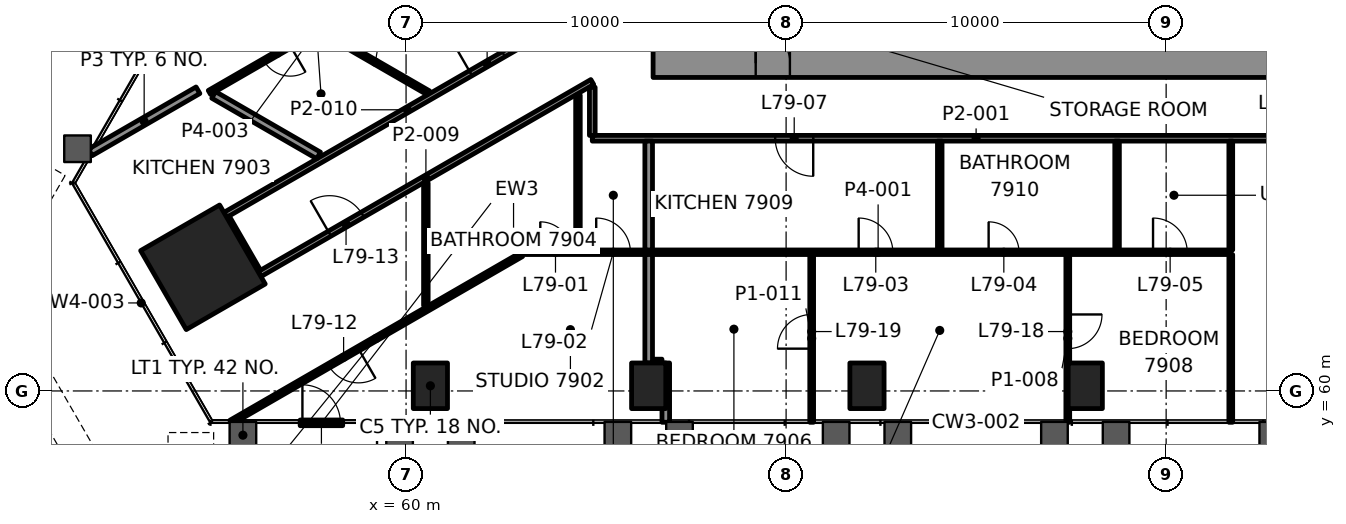
"""IFC4 building model, lengths in metres.
Left out: names, types, materials, properties, quantities, classifications, styles, units other than length and angle.
Written with IfcOpenShell. Run it as: python <this file> out.ifc"""

import sys

from ifc_helpers import new_model, si_unit, direction, frame, frame_2d, origin, origin_2d, place, context, subcontext, project, spatial, rectangle, hollow_rectangle, extrude, element, fill, save


model = new_model("IFC4")
c1 = context("Model", 3, precision=1e-05, world=origin(), true_north=direction((0.0, 1.0)))
c2 = subcontext(c1, "Body", "Model", "MODEL_VIEW")
j1 = project(units=[si_unit("LENGTHUNIT", "METRE"), si_unit("PLANEANGLEUNIT", "RADIAN")], contexts=[c1])
p1 = place(None, origin())
s1 = spatial("IfcSite", under=j1, at=p1, CompositionType="ELEMENT")
p2 = place(p1, origin())
s2 = spatial("IfcBuilding", under=s1, at=p2, CompositionType="ELEMENT")
p3 = place(p2, frame((0.0, 0.0, 323.1)))
s3 = spatial("IfcBuildingStorey", under=s2, at=p3, CompositionType="ELEMENT", Elevation=323.1)
p4 = place(p3, frame((54.655, 63.254, 0.0), z_axis=(0.0, 0.0, 1.0), x_axis=(0.5, -0.866025403784, 0.0)))
e1 = element("IfcColumn", 1, at=p4, inside=s3, PredefinedType="COLUMN", context=c2, shape_type="SweptSolid", body=[
    extrude(rectangle(XDim=2.4, YDim=2.4, at=origin_2d()), origin(), (0.0, 0.0, 1.0), 3.5),
])
for number, where, z_axis, x_axis in (
    (2, (60.64, 60.136, -0.0), (0.0, 0.0, 1.0), (1.0, 0.0, 0.0)),
    (3, (66.384, 60.136, -0.0), (0.0, 0.0, 1.0), (1.0, 0.0, 0.0)),
    (4, (72.128, 60.136, -0.0), (0.0, 0.0, 1.0), (1.0, 0.0, 0.0)),
    (5, (77.872, 60.136, -0.0), (0.0, 0.0, 1.0), (1.0, 0.0, 0.0)),
):
    element("IfcColumn", number, at=place(p3, frame(where, z_axis=z_axis, x_axis=x_axis)), inside=s3, PredefinedType="COLUMN", context=c2, shape_type="SweptSolid", body=[
        extrude(hollow_rectangle(XDim=0.9, YDim=1.2, WallThickness=0.06, at=origin_2d()), origin(), (0.0, 0.0, 1.0), 3.5),
    ])
p5 = place(p3, frame((66.5, 68.625, 0.0), z_axis=(0.0, 0.0, 1.0), x_axis=(1.0, 0.0, 0.0)))
e6 = element("IfcWall", 6, at=p5, inside=s3, PredefinedType="SHEAR", context=c2, shape_type="SweptSolid", body=[
    extrude(rectangle(XDim=17.0, YDim=0.75, at=frame_2d((8.5, 0.0))), origin(), (0.0, 0.0, 1.0), 3.2),
])
p6 = place(p5, frame((2.7, 0.0, 0.0)))
e7 = element("IfcOpeningElement", 7, at=p6, cuts=e6, PredefinedType="OPENING", context=c2, shape_type="SweptSolid", body=[
    extrude(rectangle(XDim=0.9, YDim=2.1, at=frame_2d((0.45, 1.05))), frame((0.0, 0.385, 0.0), z_axis=(0.0, -1.0, 0.0), x_axis=(1.0, 0.0, 0.0)), (0.0, 0.0, 1.0), 0.77),
])
p7 = place(p3, frame((66.484, 60.736, 0.0), z_axis=(0.0, 0.0, 1.0), x_axis=(1.0, 0.0, 0.0)))
e8 = element("IfcWall", 8, at=p7, inside=s3, PredefinedType="PARTITIONING", context=c2, shape_type="SweptSolid", body=[
    extrude(rectangle(XDim=0.25, YDim=0.2, at=frame_2d((0.125, 0.0))), origin(), (0.0, 0.0, 1.0), 2.6),
])
p8 = place(p3, frame((63.141, 63.65, 0.0), z_axis=(0.0, 0.0, 1.0), x_axis=(1.0, 0.0, 0.0)))
e9 = element("IfcWall", 9, at=p8, inside=s3, PredefinedType="PARTITIONING", context=c2, shape_type="SweptSolid", body=[
    extrude(rectangle(XDim=18.56, YDim=0.12, at=frame_2d((9.28, 0.0))), origin(), (0.0, 0.0, 1.0), 2.6),
])
p9 = place(p8, frame((0.391, 0.0, 0.0)))
e10 = element("IfcOpeningElement", 10, at=p9, cuts=e9, PredefinedType="OPENING", context=c2, shape_type="SweptSolid", body=[
    extrude(rectangle(XDim=0.8, YDim=2.1, at=frame_2d((0.4, 1.05))), frame((0.0, 0.07, 0.0), z_axis=(0.0, -1.0, 0.0), x_axis=(1.0, 0.0, 0.0)), (0.0, 0.0, 1.0), 0.14),
])
p10 = place(p8, frame((1.862, 0.0, 0.0)))
e11 = element("IfcOpeningElement", 11, at=p10, cuts=e9, PredefinedType="OPENING", context=c2, shape_type="SweptSolid", body=[
    extrude(rectangle(XDim=0.9, YDim=2.1, at=frame_2d((0.45, 1.05))), frame((0.0, 0.07, 0.0), z_axis=(0.0, -1.0, 0.0), x_axis=(1.0, 0.0, 0.0)), (0.0, 0.0, 1.0), 0.14),
])
p11 = place(p8, frame((8.768, 0.0, 0.0)))
e12 = element("IfcOpeningElement", 12, at=p11, cuts=e9, PredefinedType="OPENING", context=c2, shape_type="SweptSolid", body=[
    extrude(rectangle(XDim=0.9, YDim=2.1, at=frame_2d((0.45, 1.05))), frame((0.0, 0.07, 0.0), z_axis=(0.0, -1.0, 0.0), x_axis=(1.0, 0.0, 0.0)), (0.0, 0.0, 1.0), 0.14),
])
p12 = place(p8, frame((12.188, 0.0, 0.0)))
e13 = element("IfcOpeningElement", 13, at=p12, cuts=e9, PredefinedType="OPENING", context=c2, shape_type="SweptSolid", body=[
    extrude(rectangle(XDim=0.8, YDim=2.1, at=frame_2d((0.4, 1.05))), frame((0.0, 0.07, 0.0), z_axis=(0.0, -1.0, 0.0), x_axis=(1.0, 0.0, 0.0)), (0.0, 0.0, 1.0), 0.14),
])
p13 = place(p8, frame((16.514, 0.0, 0.0)))
e14 = element("IfcOpeningElement", 14, at=p13, cuts=e9, PredefinedType="OPENING", context=c2, shape_type="SweptSolid", body=[
    extrude(rectangle(XDim=0.9, YDim=2.1, at=frame_2d((0.45, 1.05))), frame((0.0, 0.07, 0.0), z_axis=(0.0, -1.0, 0.0), x_axis=(1.0, 0.0, 0.0)), (0.0, 0.0, 1.0), 0.14),
])
p14 = place(p3, frame((85.099, 66.65, 0.0), z_axis=(0.0, 0.0, 1.0), x_axis=(-1.0, 0.0, 0.0)))
e15 = element("IfcWall", 15, at=p14, inside=s3, PredefinedType="PARTITIONING", context=c2, shape_type="SweptSolid", body=[
    extrude(rectangle(XDim=20.199, YDim=0.15, at=frame_2d((10.1, 0.0))), origin(), (0.0, 0.0, 1.0), 2.6),
])
p15 = place(p14, frame((1.351, 0.0, 0.0)))
e16 = element("IfcOpeningElement", 16, at=p15, cuts=e15, PredefinedType="OPENING", context=c2, shape_type="SweptSolid", body=[
    extrude(rectangle(XDim=0.9, YDim=2.1, at=frame_2d((0.45, 1.05))), frame((0.0, 0.085, 0.0), z_axis=(0.0, -1.0, 0.0), x_axis=(1.0, 0.0, 0.0)), (0.0, 0.0, 1.0), 0.17),
])
p16 = place(p14, frame((14.386, 0.0, 0.0)))
e17 = element("IfcOpeningElement", 17, at=p16, cuts=e15, PredefinedType="OPENING", context=c2, shape_type="SweptSolid", body=[
    extrude(rectangle(XDim=1.0, YDim=2.1, at=frame_2d((0.5, 1.05))), frame((0.0, 0.085, 0.0), z_axis=(0.0, -1.0, 0.0), x_axis=(1.0, 0.0, 0.0)), (0.0, 0.0, 1.0), 0.17),
])
p17 = place(p3, frame((63.037, 63.59, 0.0), z_axis=(0.0, 0.0, 1.0), x_axis=(-0.866029008523, -0.499993756358, 0.0)))
e18 = element("IfcWall", 18, at=p17, inside=s3, PredefinedType="PARTITIONING", context=c2, shape_type="SweptSolid", body=[
    extrude(rectangle(XDim=8.828, YDim=0.12, at=frame_2d((4.414, 0.0))), origin(), (0.0, 0.0, 1.0), 2.6),
])
p18 = place(p17, frame((4.955, 0.0, 0.0)))
e19 = element("IfcOpeningElement", 19, at=p18, cuts=e18, PredefinedType="OPENING", context=c2, shape_type="SweptSolid", body=[
    extrude(rectangle(XDim=0.9, YDim=2.1, at=frame_2d((0.45, 1.05))), frame((0.0, 0.07, 0.0), z_axis=(0.0, -1.0, 0.0), x_axis=(1.0, 0.0, 0.0)), (0.0, 0.0, 1.0), 0.14),
])
p19 = place(p3, frame((56.145, 63.075, 0.0), z_axis=(0.0, 0.0, 1.0), x_axis=(0.866024727794, 0.500001170848, 0.0)))
e20 = element("IfcWall", 20, at=p19, inside=s3, PredefinedType="PARTITIONING", context=c2, shape_type="SweptSolid", body=[
    extrude(rectangle(XDim=10.11, YDim=0.15, at=frame_2d((5.055, 0.0))), origin(), (0.0, 0.0, 1.0), 2.597),
])
p20 = place(p19, frame((2.128, 0.0, 0.0)))
e21 = element("IfcOpeningElement", 21, at=p20, cuts=e20, PredefinedType="OPENING", context=c2, shape_type="SweptSolid", body=[
    extrude(rectangle(XDim=1.0, YDim=2.1, at=frame_2d((0.5, 1.05))), frame((0.0, 0.085, 0.0), z_axis=(0.0, -1.0, 0.0), x_axis=(1.0, 0.0, 0.0)), (0.0, 0.0, 1.0), 0.17),
])
p21 = place(p3, frame((55.244, 64.634, 0.0), z_axis=(0.0, 0.0, 1.0), x_axis=(0.866029028053, 0.499993722531, 0.0)))
e22 = element("IfcWall", 22, at=p21, inside=s3, PredefinedType="PARTITIONING", context=c2, shape_type="SweptSolid", body=[
    extrude(rectangle(XDim=11.063, YDim=0.15, at=frame_2d((5.531, 0.0))), origin(), (0.0, 0.0, 1.0), 2.6),
])
p22 = place(p21, frame((7.454, 0.0, 0.0)))
e23 = element("IfcOpeningElement", 23, at=p22, cuts=e22, PredefinedType="OPENING", context=c2, shape_type="SweptSolid", body=[
    extrude(rectangle(XDim=1.0, YDim=2.1, at=frame_2d((0.5, 1.05))), frame((0.0, 0.085, 0.0), z_axis=(0.0, -1.0, 0.0), x_axis=(1.0, 0.0, 0.0)), (0.0, 0.0, 1.0), 0.17),
])
p23 = place(p3, frame((60.485, 71.123, 0.0), z_axis=(0.0, 0.0, 1.0), x_axis=(-0.866018230694, -0.500012423951, 0.0)))
e24 = element("IfcWall", 24, at=p23, inside=s3, PredefinedType="PARTITIONING", context=c2, shape_type="SweptSolid", body=[
    extrude(rectangle(XDim=6.535, YDim=0.12, at=frame_2d((3.268, 0.0))), origin(), (0.0, 0.0, 1.0), 2.6),
])
p24 = place(p23, frame((1.261, 0.0, 0.0)))
e25 = element("IfcOpeningElement", 25, at=p24, cuts=e24, PredefinedType="OPENING", context=c2, shape_type="SweptSolid", body=[
    extrude(rectangle(XDim=0.9, YDim=2.1, at=frame_2d((0.45, 1.05))), frame((0.0, 0.07, 0.0), z_axis=(0.0, -1.0, 0.0), x_axis=(1.0, 0.0, 0.0)), (0.0, 0.0, 1.0), 0.14),
])
p25 = place(p23, frame((4.077, 0.0, 0.0)))
e26 = element("IfcOpeningElement", 26, at=p25, cuts=e24, PredefinedType="OPENING", context=c2, shape_type="SweptSolid", body=[
    extrude(rectangle(XDim=0.8, YDim=2.1, at=frame_2d((0.4, 1.05))), frame((0.0, 0.07, 0.0), z_axis=(0.0, -1.0, 0.0), x_axis=(1.0, 0.0, 0.0)), (0.0, 0.0, 1.0), 0.14),
])
p26 = place(p3, frame((51.692, 66.278, 0.0), z_axis=(0.0, 0.0, 1.0), x_axis=(0.866020247087, 0.500008931556, 0.0)))
e27 = element("IfcWall", 27, at=p26, inside=s3, PredefinedType="PARTITIONING", context=c2, shape_type="SweptSolid", body=[
    extrude(rectangle(XDim=3.271, YDim=0.2, at=frame_2d((1.635, 0.0))), origin(), (0.0, 0.0, 1.0), 2.6),
])
p27 = place(p3, frame((81.701, 59.176, 0.0), z_axis=(0.0, 0.0, 1.0), x_axis=(0.0, 1.0, 0.0)))
e28 = element("IfcWall", 28, at=p27, inside=s3, PredefinedType="PARTITIONING", context=c2, shape_type="SweptSolid", body=[
    extrude(rectangle(XDim=4.414, YDim=0.1, at=frame_2d((2.207, 0.0))), origin(), (0.0, 0.0, 1.0), 2.588),
])
p28 = place(p3, frame((78.709, 63.71, 0.0), z_axis=(0.0, 0.0, 1.0), x_axis=(0.0, 1.0, 0.0)))
e29 = element("IfcWall", 29, at=p28, inside=s3, PredefinedType="PARTITIONING", context=c2, shape_type="SweptSolid", body=[
    extrude(rectangle(XDim=2.865, YDim=0.12, at=frame_2d((1.433, 0.0))), origin(), (0.0, 0.0, 1.0), 2.6),
])
p29 = place(p3, frame((77.412, 63.59, 0.0), z_axis=(0.0, 0.0, 1.0), x_axis=(0.0, -1.0, 0.0)))
e30 = element("IfcWall", 30, at=p29, inside=s3, PredefinedType="PARTITIONING", context=c2, shape_type="SweptSolid", body=[
    extrude(rectangle(XDim=4.414, YDim=0.1, at=frame_2d((2.207, 0.0))), origin(), (0.0, 0.0, 1.0), 2.588),
])
p30 = place(p29, frame((1.577, 0.0, 0.0)))
e31 = element("IfcOpeningElement", 31, at=p30, cuts=e30, PredefinedType="OPENING", context=c2, shape_type="SweptSolid", body=[
    extrude(rectangle(XDim=0.9, YDim=2.1, at=frame_2d((0.45, 1.05))), frame((0.0, 0.06, 0.0), z_axis=(0.0, -1.0, 0.0), x_axis=(1.0, 0.0, 0.0)), (0.0, 0.0, 1.0), 0.12),
])
p31 = place(p3, frame((74.043, 63.71, 0.0), z_axis=(0.0, 0.0, 1.0), x_axis=(0.0, 1.0, 0.0)))
e32 = element("IfcWall", 32, at=p31, inside=s3, PredefinedType="PARTITIONING", context=c2, shape_type="SweptSolid", body=[
    extrude(rectangle(XDim=2.865, YDim=0.12, at=frame_2d((1.433, 0.0))), origin(), (0.0, 0.0, 1.0), 2.6),
])
p32 = place(p3, frame((70.673, 59.176, 0.0), z_axis=(0.0, 0.0, 1.0), x_axis=(0.0, 1.0, 0.0)))
e33 = element("IfcWall", 33, at=p32, inside=s3, PredefinedType="PARTITIONING", context=c2, shape_type="SweptSolid", body=[
    extrude(rectangle(XDim=4.414, YDim=0.1, at=frame_2d((2.207, 0.0))), origin(), (0.0, 0.0, 1.0), 2.588),
])
p33 = place(p32, frame((1.937, 0.0, 0.0)))
e34 = element("IfcOpeningElement", 34, at=p33, cuts=e33, PredefinedType="OPENING", context=c2, shape_type="SweptSolid", body=[
    extrude(rectangle(XDim=0.9, YDim=2.1, at=frame_2d((0.45, 1.05))), frame((0.0, 0.06, 0.0), z_axis=(0.0, -1.0, 0.0), x_axis=(1.0, 0.0, 0.0)), (0.0, 0.0, 1.0), 0.12),
])
p34 = place(p3, frame((66.834, 59.176, 0.0), z_axis=(0.0, 0.0, 1.0), x_axis=(0.0, 1.0, 0.0)))
e35 = element("IfcWall", 35, at=p34, inside=s3, PredefinedType="PARTITIONING", context=c2, shape_type="SweptSolid", body=[
    extrude(rectangle(XDim=1.56, YDim=0.2, at=frame_2d((0.78, 0.0))), origin(), (0.0, 0.0, 1.0), 2.588),
])
p35 = place(p3, frame((66.384, 60.736, 0.0), z_axis=(0.0, 0.0, 1.0), x_axis=(0.0, 1.0, 0.0)))
e36 = element("IfcWall", 36, at=p35, inside=s3, PredefinedType="PARTITIONING", context=c2, shape_type="SweptSolid", body=[
    extrude(rectangle(XDim=2.854, YDim=0.2, at=frame_2d((1.427, 0.0))), origin(), (0.0, 0.0, 1.0), 2.6),
])
p36 = place(p3, frame((64.9, 66.725, 0.0), z_axis=(0.0, 0.0, 1.0), x_axis=(0.0, 1.0, 0.0)))
e37 = element("IfcWall", 37, at=p36, inside=s3, PredefinedType="PARTITIONING", context=c2, shape_type="SweptSolid", body=[
    extrude(rectangle(XDim=1.268, YDim=0.15, at=frame_2d((0.634, 0.0))), origin(), (0.0, 0.0, 1.0), 2.597),
])
p37 = place(p3, frame((64.523, 63.71, 0.0), z_axis=(0.0, 0.0, 1.0), x_axis=(0.0, 1.0, 0.0)))
e38 = element("IfcWall", 38, at=p37, inside=s3, PredefinedType="PARTITIONING", context=c2, shape_type="SweptSolid", body=[
    extrude(rectangle(XDim=4.075, YDim=0.12, at=frame_2d((2.038, 0.0))), origin(), (0.0, 0.0, 1.0), 2.597),
])
p38 = place(p3, frame((60.521, 62.247, 0.0), z_axis=(0.0, 0.0, 1.0), x_axis=(0.0, 1.0, 0.0)))
e39 = element("IfcWall", 39, at=p38, inside=s3, PredefinedType="PARTITIONING", context=c2, shape_type="SweptSolid", body=[
    extrude(rectangle(XDim=3.228, YDim=0.12, at=frame_2d((1.614, 0.0))), origin(), (0.0, 0.0, 1.0), 2.6),
])
p39 = place(p3, frame((56.106, 63.139, 0.0), z_axis=(0.0, 0.0, 1.0), x_axis=(-0.499944585209, 0.866057395165, 0.0)))
e40 = element("IfcWall", 40, at=p39, inside=s3, PredefinedType="PARTITIONING", context=c2, shape_type="SweptSolid", body=[
    extrude(rectangle(XDim=1.649, YDim=0.15, at=frame_2d((0.825, 0.0))), origin(), (0.0, 0.0, 1.0), 2.597),
])
p40 = place(p3, frame((60.588, 67.845, 0.0), z_axis=(0.0, 0.0, 1.0), x_axis=(-0.86605210011, 0.499953757757, 0.0)))
e41 = element("IfcWall", 41, at=p40, inside=s3, PredefinedType="PARTITIONING", context=c2, shape_type="SweptSolid", body=[
    extrude(rectangle(XDim=3.228, YDim=0.12, at=frame_2d((1.614, 0.0))), origin(), (0.0, 0.0, 1.0), 2.6),
])
p41 = place(p3, frame((57.698, 66.197, 0.0), z_axis=(0.0, 0.0, 1.0), x_axis=(-0.866019818373, 0.500009674092, 0.0)))
e42 = element("IfcWall", 42, at=p41, inside=s3, PredefinedType="PARTITIONING", context=c2, shape_type="SweptSolid", body=[
    extrude(rectangle(XDim=3.188, YDim=0.2, at=frame_2d((1.594, 0.0))), origin(), (0.0, 0.0, 1.0), 2.6),
])
p42 = place(p3, frame((81.701, 63.71, 0.0), z_axis=(0.0, 0.0, 1.0), x_axis=(0.0, 1.0, 0.0)))
e43 = element("IfcWall", 43, at=p42, inside=s3, PredefinedType="PARTITIONING", context=c2, shape_type="SweptSolid", body=[
    extrude(rectangle(XDim=2.865, YDim=0.1, at=frame_2d((1.433, 0.0))), origin(), (0.0, 0.0, 1.0), 2.6),
])
p43 = place(p3, frame((66.384, 63.71, 0.0), z_axis=(0.0, 0.0, 1.0), x_axis=(0.0, 1.0, 0.0)))
e44 = element("IfcWall", 44, at=p43, inside=s3, PredefinedType="PARTITIONING", context=c2, shape_type="SweptSolid", body=[
    extrude(rectangle(XDim=2.865, YDim=0.2, at=frame_2d((1.433, 0.0))), origin(), (0.0, 0.0, 1.0), 2.6),
])
p44 = place(p3, frame((69.117, 103.238, 0.0), z_axis=(0.0, 0.0, 1.0), x_axis=(-0.500001437611, -0.866024573778, 0.0)))
e45 = element("IfcWall", 45, at=p44, inside=s3, PredefinedType="SOLIDWALL", context=c2, shape_type="SweptSolid", body=[
    extrude(rectangle(XDim=43.027, YDim=0.8, at=frame_2d((21.513, 0.0))), origin(), (0.0, 0.0, 1.0), 0.9),
])
p45 = place(p3, frame((47.604, 64.967, 0.0), z_axis=(0.0, 0.0, 1.0), x_axis=(0.49999175339, -0.866030164915, 0.0)))
e46 = element("IfcWall", 46, at=p45, inside=s3, PredefinedType="SOLIDWALL", context=c2, shape_type="SweptSolid", body=[
    extrude(rectangle(XDim=10.019, YDim=0.8, at=frame_2d((5.009, 0.0))), origin(), (0.0, 0.0, 1.0), 0.9),
])
p46 = place(p9, origin())
e47 = element("IfcDoor", 47, at=p46, inside=s3, OperationType="SINGLE_SWING_RIGHT", PredefinedType="DOOR", context=c2, shape_type="SweptSolid", body=[
    extrude(rectangle(XDim=0.8, YDim=2.1, at=frame_2d((0.4, 1.05))), frame((0.0, 0.025, 0.0), z_axis=(0.0, -1.0, 0.0), x_axis=(1.0, 0.0, 0.0)), (0.0, 0.0, 1.0), 0.05),
])
fill(e10, e47)
p47 = place(p10, origin())
e48 = element("IfcDoor", 48, at=p47, inside=s3, OperationType="SINGLE_SWING_LEFT", PredefinedType="DOOR", context=c2, shape_type="SweptSolid", body=[
    extrude(rectangle(XDim=0.9, YDim=2.1, at=frame_2d((0.45, 1.05))), frame((0.0, 0.025, 0.0), z_axis=(0.0, -1.0, 0.0), x_axis=(1.0, 0.0, 0.0)), (0.0, 0.0, 1.0), 0.05),
])
fill(e11, e48)
p48 = place(p11, origin())
e49 = element("IfcDoor", 49, at=p48, inside=s3, OperationType="SINGLE_SWING_RIGHT", PredefinedType="DOOR", context=c2, shape_type="SweptSolid", body=[
    extrude(rectangle(XDim=0.9, YDim=2.1, at=frame_2d((0.45, 1.05))), frame((0.0, 0.025, 0.0), z_axis=(0.0, -1.0, 0.0), x_axis=(1.0, 0.0, 0.0)), (0.0, 0.0, 1.0), 0.05),
])
fill(e12, e49)
p49 = place(p12, origin())
e50 = element("IfcDoor", 50, at=p49, inside=s3, OperationType="SINGLE_SWING_LEFT", PredefinedType="DOOR", context=c2, shape_type="SweptSolid", body=[
    extrude(rectangle(XDim=0.8, YDim=2.1, at=frame_2d((0.4, 1.05))), frame((0.0, 0.025, 0.0), z_axis=(0.0, -1.0, 0.0), x_axis=(1.0, 0.0, 0.0)), (0.0, 0.0, 1.0), 0.05),
])
fill(e13, e50)
p50 = place(p13, origin())
e51 = element("IfcDoor", 51, at=p50, inside=s3, OperationType="SINGLE_SWING_RIGHT", PredefinedType="DOOR", context=c2, shape_type="SweptSolid", body=[
    extrude(rectangle(XDim=0.9, YDim=2.1, at=frame_2d((0.45, 1.05))), frame((0.0, 0.025, 0.0), z_axis=(0.0, -1.0, 0.0), x_axis=(1.0, 0.0, 0.0)), (0.0, 0.0, 1.0), 0.05),
])
fill(e14, e51)
p51 = place(p16, origin())
e52 = element("IfcDoor", 52, at=p51, inside=s3, OperationType="SINGLE_SWING_RIGHT", PredefinedType="DOOR", context=c2, shape_type="SweptSolid", body=[
    extrude(rectangle(XDim=1.0, YDim=2.1, at=frame_2d((0.5, 1.05))), frame((0.0, 0.025, 0.0), z_axis=(0.0, -1.0, 0.0), x_axis=(1.0, 0.0, 0.0)), (0.0, 0.0, 1.0), 0.05),
])
fill(e17, e52)
p52 = place(p18, origin())
e53 = element("IfcDoor", 53, at=p52, inside=s3, OperationType="SINGLE_SWING_LEFT", PredefinedType="DOOR", context=c2, shape_type="SweptSolid", body=[
    extrude(rectangle(XDim=0.9, YDim=2.1, at=frame_2d((0.45, 1.05))), frame((0.0, 0.025, 0.0), z_axis=(0.0, -1.0, 0.0), x_axis=(1.0, 0.0, 0.0)), (0.0, 0.0, 1.0), 0.05),
])
fill(e19, e53)
p53 = place(p20, origin())
e54 = element("IfcDoor", 54, at=p53, inside=s3, OperationType="SINGLE_SWING_LEFT", PredefinedType="DOOR", context=c2, shape_type="SweptSolid", body=[
    extrude(rectangle(XDim=1.0, YDim=2.1, at=frame_2d((0.5, 1.05))), frame((0.0, 0.025, 0.0), z_axis=(0.0, -1.0, 0.0), x_axis=(1.0, 0.0, 0.0)), (0.0, 0.0, 1.0), 0.05),
])
fill(e21, e54)
p54 = place(p22, origin())
e55 = element("IfcDoor", 55, at=p54, inside=s3, OperationType="SINGLE_SWING_LEFT", PredefinedType="DOOR", context=c2, shape_type="SweptSolid", body=[
    extrude(rectangle(XDim=1.0, YDim=2.1, at=frame_2d((0.5, 1.05))), frame((0.0, 0.025, 0.0), z_axis=(0.0, -1.0, 0.0), x_axis=(1.0, 0.0, 0.0)), (0.0, 0.0, 1.0), 0.05),
])
fill(e23, e55)
p55 = place(p25, origin())
e56 = element("IfcDoor", 56, at=p55, inside=s3, OperationType="SINGLE_SWING_LEFT", PredefinedType="DOOR", context=c2, shape_type="SweptSolid", body=[
    extrude(rectangle(XDim=0.8, YDim=2.1, at=frame_2d((0.4, 1.05))), frame((0.0, 0.025, 0.0), z_axis=(0.0, -1.0, 0.0), x_axis=(1.0, 0.0, 0.0)), (0.0, 0.0, 1.0), 0.05),
])
fill(e26, e56)
p56 = place(p30, origin())
e57 = element("IfcDoor", 57, at=p56, inside=s3, OperationType="SINGLE_SWING_LEFT", PredefinedType="DOOR", context=c2, shape_type="SweptSolid", body=[
    extrude(rectangle(XDim=0.9, YDim=2.1, at=frame_2d((0.45, 1.05))), frame((0.0, 0.025, 0.0), z_axis=(0.0, -1.0, 0.0), x_axis=(1.0, 0.0, 0.0)), (0.0, 0.0, 1.0), 0.05),
])
fill(e31, e57)
p57 = place(p33, origin())
e58 = element("IfcDoor", 58, at=p57, inside=s3, OperationType="SINGLE_SWING_LEFT", PredefinedType="DOOR", context=c2, shape_type="SweptSolid", body=[
    extrude(rectangle(XDim=0.9, YDim=2.1, at=frame_2d((0.45, 1.05))), frame((0.0, 0.025, 0.0), z_axis=(0.0, -1.0, 0.0), x_axis=(1.0, 0.0, 0.0)), (0.0, 0.0, 1.0), 0.05),
])
fill(e34, e58)
p58 = place(p3, frame((57.213, 59.161, 0.0), z_axis=(0.0, 0.0, 1.0), x_axis=(1.0, 0.0, 0.0)))
p59 = place(p58, frame((0.06, 0.0, 0.0)))
p60 = place(p59, origin())
e59 = element("IfcDoor", 59, at=p60, inside=s3, OperationType="SINGLE_SWING_RIGHT", PredefinedType="DOOR", context=c2, shape_type="SweptSolid", body=[
    extrude(rectangle(XDim=1.0, YDim=2.1, at=frame_2d((0.5, 1.05))), frame((0.0, 0.025, 0.0), z_axis=(0.0, -1.0, 0.0), x_axis=(1.0, 0.0, 0.0)), (0.0, 0.0, 1.0), 0.05),
])
p61 = place(p6, origin())
e60 = element("IfcDoor", 60, at=p61, inside=s3, OperationType="SINGLE_SWING_LEFT", PredefinedType="DOOR", context=c2, shape_type="SweptSolid", body=[
    extrude(rectangle(XDim=0.9, YDim=2.1, at=frame_2d((0.45, 1.05))), frame((0.0, 0.095, 0.0), z_axis=(0.0, -1.0, 0.0), x_axis=(1.0, 0.0, 0.0)), (0.0, 0.0, 1.0), 0.19),
])
fill(e7, e60)
save(model, sys.argv[1])
